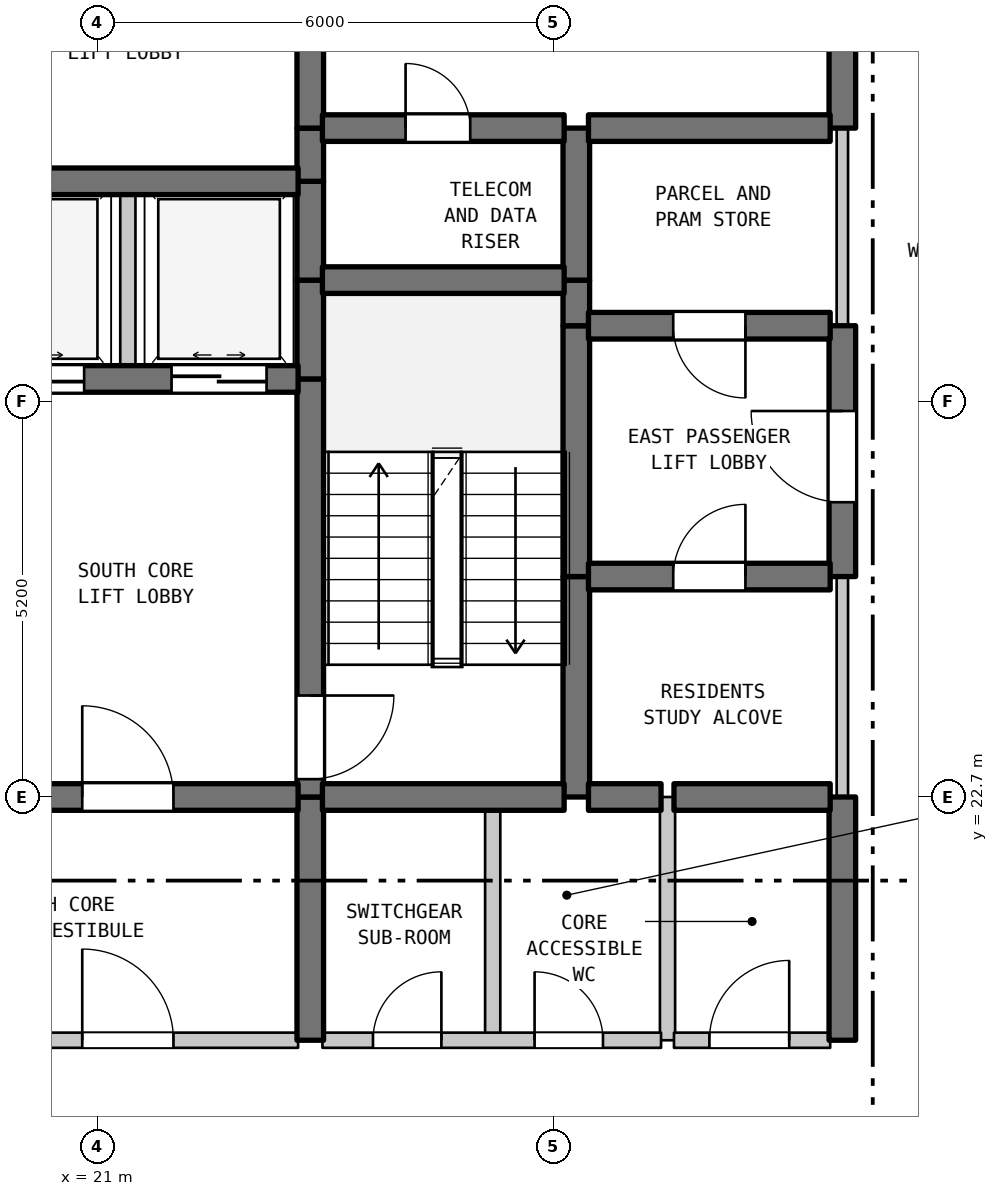
"""IFC4 building model, lengths in metres.
Left out: names, types, materials, properties, quantities, classifications, styles, units other than length and angle.
Written with IfcOpenShell. Run it as: python <this file> out.ifc"""

import sys

from ifc_helpers import new_model, si_unit, direction, frame, frame_2d, origin, place, context, subcontext, project, spatial, rectangle, extrude, element, fill, save


model = new_model("IFC4")
c1 = context("Model", 3, precision=1e-05, world=origin(), true_north=direction((0.0, 1.0)))
c2 = subcontext(c1, "Body", "Model", "MODEL_VIEW")
j1 = project(units=[si_unit("LENGTHUNIT", "METRE"), si_unit("PLANEANGLEUNIT", "RADIAN")], contexts=[c1])
p1 = place(None, origin())
s1 = spatial("IfcSite", under=j1, at=p1, CompositionType="ELEMENT")
p2 = place(p1, origin())
s2 = spatial("IfcBuilding", under=s1, at=p2, CompositionType="ELEMENT")
p3 = place(p2, frame((0.0, 0.0, 226.5)))
s3 = spatial("IfcBuildingStorey", under=s2, at=p3, CompositionType="ELEMENT", Elevation=226.5)
p4 = place(p3, frame((21.4, 28.2, 0.0), z_axis=(0.0, 0.0, 1.0), x_axis=(0.0, 1.0, 0.0)))
e1 = element("IfcWall", 1, at=p4, inside=s3, PredefinedType="STANDARD", context=c2, shape_type="SweptSolid", body=[
    extrude(rectangle(XDim=2.6, YDim=0.2, at=frame_2d((1.3, 0.0))), origin(), (0.0, 0.0, 1.0), 3.39),
])
p5 = place(p3, frame((23.8, 19.5, 0.0), z_axis=(0.0, 0.0, 1.0), x_axis=(0.0, 1.0, 0.0)))
e2 = element("IfcWall", 2, at=p5, inside=s3, PredefinedType="SHEAR", context=c2, shape_type="SweptSolid", body=[
    extrude(rectangle(XDim=3.2, YDim=0.35, at=frame_2d((1.6, 0.0))), origin(), (0.0, 0.0, 1.0), 3.39),
])
p6 = place(p3, frame((23.8, 22.7, 0.0), z_axis=(0.0, 0.0, 1.0), x_axis=(0.0, 1.0, 0.0)))
e3 = element("IfcWall", 3, at=p6, inside=s3, PredefinedType="SHEAR", context=c2, shape_type="SweptSolid", body=[
    extrude(rectangle(XDim=5.5, YDim=0.35, at=frame_2d((2.75, 0.0))), origin(), (0.0, 0.0, 1.0), 3.39),
])
p7 = place(p6, frame((0.235, 0.0, 0.0)))
e4 = element("IfcOpeningElement", 4, at=p7, cuts=e3, PredefinedType="OPENING", context=c2, shape_type="SweptSolid", body=[
    extrude(rectangle(XDim=1.1, YDim=2.15, at=frame_2d((0.55, 1.075))), frame((0.0, 0.185, 0.0), z_axis=(0.0, -1.0, 0.0), x_axis=(1.0, 0.0, 0.0)), (0.0, 0.0, 1.0), 0.37),
])
for number, where, z_axis, x_axis in (
    (5, (23.8, 28.2, 0.0), (0.0, 0.0, 1.0), (0.0, 1.0, 0.0)),
    (6, (23.8, 29.5, 0.0), (0.0, 0.0, 1.0), (0.0, 1.0, 0.0)),
):
    element("IfcWall", number, at=place(p3, frame(where, z_axis=z_axis, x_axis=x_axis)), inside=s3, PredefinedType="SHEAR", context=c2, shape_type="SweptSolid", body=[
        extrude(rectangle(XDim=1.3, YDim=0.35, at=frame_2d((0.65, 0.0))), origin(), (0.0, 0.0, 1.0), 3.39),
    ])
p8 = place(p3, frame((23.8, 30.8, 0.0), z_axis=(0.0, 0.0, 1.0), x_axis=(0.0, 1.0, 0.0)))
e7 = element("IfcWall", 7, at=p8, inside=s3, PredefinedType="SHEAR", context=c2, shape_type="SweptSolid", body=[
    extrude(rectangle(XDim=0.7, YDim=0.35, at=frame_2d((0.35, 0.0))), origin(), (0.0, 0.0, 1.0), 3.39),
])
p9 = place(p3, frame((23.8, 31.5, 0.0), z_axis=(0.0, 0.0, 1.0), x_axis=(0.0, 1.0, 0.0)))
e8 = element("IfcWall", 8, at=p9, inside=s3, PredefinedType="SHEAR", context=c2, shape_type="SweptSolid", body=[
    extrude(rectangle(XDim=3.5, YDim=0.35, at=frame_2d((1.75, 0.0))), origin(), (0.0, 0.0, 1.0), 3.39),
])
p10 = place(p9, frame((1.127, 0.0, 0.0)))
e9 = element("IfcOpeningElement", 9, at=p10, cuts=e8, PredefinedType="OPENING", context=c2, shape_type="SweptSolid", body=[
    extrude(rectangle(XDim=1.1, YDim=2.15, at=frame_2d((0.55, 1.075))), frame((0.0, 0.185, 0.0), z_axis=(0.0, -1.0, 0.0), x_axis=(1.0, 0.0, 0.0)), (0.0, 0.0, 1.0), 0.37),
])
p11 = place(p3, frame((26.2, 19.5, 0.0), z_axis=(0.0, 0.0, 1.0), x_axis=(0.0, 1.0, 0.0)))
e10 = element("IfcWall", 10, at=p11, inside=s3, PredefinedType="STANDARD", context=c2, shape_type="SweptSolid", body=[
    extrude(rectangle(XDim=3.2, YDim=0.2, at=frame_2d((1.6, 0.0))), origin(), (0.0, 0.0, 1.0), 3.39),
])
p12 = place(p3, frame((27.3, 22.7, 0.0), z_axis=(0.0, 0.0, 1.0), x_axis=(0.0, 1.0, 0.0)))
e11 = element("IfcWall", 11, at=p12, inside=s3, PredefinedType="SHEAR", context=c2, shape_type="SweptSolid", body=[
    extrude(rectangle(XDim=2.9, YDim=0.35, at=frame_2d((1.45, 0.0))), origin(), (0.0, 0.0, 1.0), 3.39),
])
p13 = place(p3, frame((27.3, 25.6, 0.0), z_axis=(0.0, 0.0, 1.0), x_axis=(0.0, 1.0, 0.0)))
e12 = element("IfcWall", 12, at=p13, inside=s3, PredefinedType="SHEAR", context=c2, shape_type="SweptSolid", body=[
    extrude(rectangle(XDim=3.3, YDim=0.35, at=frame_2d((1.65, 0.0))), origin(), (0.0, 0.0, 1.0), 3.39),
])
p14 = place(p3, frame((27.3, 28.9, 0.0), z_axis=(0.0, 0.0, 1.0), x_axis=(0.0, 1.0, 0.0)))
e13 = element("IfcWall", 13, at=p14, inside=s3, PredefinedType="SHEAR", context=c2, shape_type="SweptSolid", body=[
    extrude(rectangle(XDim=0.6, YDim=0.35, at=frame_2d((0.3, 0.0))), origin(), (0.0, 0.0, 1.0), 3.39),
])
p15 = place(p3, frame((27.3, 29.5, 0.0), z_axis=(0.0, 0.0, 1.0), x_axis=(0.0, 1.0, 0.0)))
e14 = element("IfcWall", 14, at=p15, inside=s3, PredefinedType="SHEAR", context=c2, shape_type="SweptSolid", body=[
    extrude(rectangle(XDim=2.0, YDim=0.35, at=frame_2d((1.0, 0.0))), origin(), (0.0, 0.0, 1.0), 3.39),
])
p16 = place(p3, frame((28.5, 19.5, 0.0), z_axis=(0.0, 0.0, 1.0), x_axis=(0.0, 1.0, 0.0)))
e15 = element("IfcWall", 15, at=p16, inside=s3, PredefinedType="STANDARD", context=c2, shape_type="SweptSolid", body=[
    extrude(rectangle(XDim=3.2, YDim=0.2, at=frame_2d((1.6, 0.0))), origin(), (0.0, 0.0, 1.0), 3.39),
])
p17 = place(p3, frame((30.8, 19.5, 0.0), z_axis=(0.0, 0.0, 1.0), x_axis=(0.0, 1.0, 0.0)))
e16 = element("IfcWall", 16, at=p17, inside=s3, PredefinedType="SHEAR", context=c2, shape_type="SweptSolid", body=[
    extrude(rectangle(XDim=3.2, YDim=0.35, at=frame_2d((1.6, 0.0))), origin(), (0.0, 0.0, 1.0), 3.39),
])
p18 = place(p3, frame((30.8, 22.7, 0.0), z_axis=(0.0, 0.0, 1.0), x_axis=(0.0, 1.0, 0.0)))
e17 = element("IfcWall", 17, at=p18, inside=s3, PredefinedType="STANDARD", context=c2, shape_type="SweptSolid", body=[
    extrude(rectangle(XDim=2.9, YDim=0.15, at=frame_2d((1.45, 0.0))), origin(), (0.0, 0.0, 1.0), 3.39),
])
p19 = place(p3, frame((30.8, 25.6, 0.0), z_axis=(0.0, 0.0, 1.0), x_axis=(0.0, 1.0, 0.0)))
e18 = element("IfcWall", 18, at=p19, inside=s3, PredefinedType="SHEAR", context=c2, shape_type="SweptSolid", body=[
    extrude(rectangle(XDim=3.3, YDim=0.35, at=frame_2d((1.65, 0.0))), origin(), (0.0, 0.0, 1.0), 3.39),
])
p20 = place(p19, frame((0.978, 0.0, 0.0)))
e19 = element("IfcOpeningElement", 19, at=p20, cuts=e18, PredefinedType="OPENING", context=c2, shape_type="SweptSolid", body=[
    extrude(rectangle(XDim=1.2, YDim=2.2, at=frame_2d((0.6, 1.1))), frame((0.0, 0.185, 0.0), z_axis=(0.0, -1.0, 0.0), x_axis=(1.0, 0.0, 0.0)), (0.0, 0.0, 1.0), 0.37),
])
p21 = place(p3, frame((30.8, 28.9, 0.0), z_axis=(0.0, 0.0, 1.0), x_axis=(0.0, 1.0, 0.0)))
e20 = element("IfcWall", 20, at=p21, inside=s3, PredefinedType="STANDARD", context=c2, shape_type="SweptSolid", body=[
    extrude(rectangle(XDim=2.6, YDim=0.15, at=frame_2d((1.3, 0.0))), origin(), (0.0, 0.0, 1.0), 3.39),
])
p22 = place(p3, frame((30.8, 31.5, 0.0), z_axis=(0.0, 0.0, 1.0), x_axis=(0.0, 1.0, 0.0)))
e21 = element("IfcWall", 21, at=p22, inside=s3, PredefinedType="SHEAR", context=c2, shape_type="SweptSolid", body=[
    extrude(rectangle(XDim=3.5, YDim=0.35, at=frame_2d((1.75, 0.0))), origin(), (0.0, 0.0, 1.0), 3.39),
])
p23 = place(p22, frame((1.15, 0.0, 0.0)))
e22 = element("IfcOpeningElement", 22, at=p23, cuts=e21, PredefinedType="OPENING", context=c2, shape_type="SweptSolid", body=[
    extrude(rectangle(XDim=1.2, YDim=2.2, at=frame_2d((0.6, 1.1))), frame((0.0, 0.185, 0.0), z_axis=(0.0, -1.0, 0.0), x_axis=(1.0, 0.0, 0.0)), (0.0, 0.0, 1.0), 0.37),
])
p24 = place(p3, frame((19.16, 19.5, 0.0), z_axis=(0.0, 0.0, 1.0), x_axis=(1.0, 0.0, 0.0)))
e23 = element("IfcWall", 23, at=p24, inside=s3, PredefinedType="STANDARD", context=c2, shape_type="SweptSolid", body=[
    extrude(rectangle(XDim=4.48, YDim=0.2, at=frame_2d((2.24, 0.0))), origin(), (0.0, 0.0, 1.0), 3.39),
])
p25 = place(p24, frame((1.64, 0.0, 0.0)))
e24 = element("IfcOpeningElement", 24, at=p25, cuts=e23, PredefinedType="OPENING", context=c2, shape_type="SweptSolid", body=[
    extrude(rectangle(XDim=1.2, YDim=2.2, at=frame_2d((0.6, 1.1))), frame((0.0, 0.11, 0.0), z_axis=(0.0, -1.0, 0.0), x_axis=(1.0, 0.0, 0.0)), (0.0, 0.0, 1.0), 0.22),
])
p26 = place(p3, frame((23.96, 19.5, 0.0), z_axis=(0.0, 0.0, 1.0), x_axis=(1.0, 0.0, 0.0)))
e25 = element("IfcWall", 25, at=p26, inside=s3, PredefinedType="STANDARD", context=c2, shape_type="SweptSolid", body=[
    extrude(rectangle(XDim=4.455, YDim=0.2, at=frame_2d((2.228, 0.0))), origin(), (0.0, 0.0, 1.0), 3.39),
])
p27 = place(p26, frame((0.665, 0.0, 0.0)))
e26 = element("IfcOpeningElement", 26, at=p27, cuts=e25, PredefinedType="OPENING", context=c2, shape_type="SweptSolid", body=[
    extrude(rectangle(XDim=0.9, YDim=2.15, at=frame_2d((0.45, 1.075))), frame((0.0, 0.11, 0.0), z_axis=(0.0, -1.0, 0.0), x_axis=(1.0, 0.0, 0.0)), (0.0, 0.0, 1.0), 0.22),
])
p28 = place(p26, frame((2.791, 0.0, 0.0)))
e27 = element("IfcOpeningElement", 27, at=p28, cuts=e25, PredefinedType="OPENING", context=c2, shape_type="SweptSolid", body=[
    extrude(rectangle(XDim=0.9, YDim=2.15, at=frame_2d((0.45, 1.075))), frame((0.0, 0.11, 0.0), z_axis=(0.0, -1.0, 0.0), x_axis=(1.0, 0.0, 0.0)), (0.0, 0.0, 1.0), 0.22),
])
p29 = place(p3, frame((28.585, 19.5, 0.0), z_axis=(0.0, 0.0, 1.0), x_axis=(1.0, 0.0, 0.0)))
e28 = element("IfcWall", 28, at=p29, inside=s3, PredefinedType="STANDARD", context=c2, shape_type="SweptSolid", body=[
    extrude(rectangle(XDim=2.055, YDim=0.2, at=frame_2d((1.027, 0.0))), origin(), (0.0, 0.0, 1.0), 3.39),
])
p30 = place(p29, frame((0.466, 0.0, 0.0)))
e29 = element("IfcOpeningElement", 29, at=p30, cuts=e28, PredefinedType="OPENING", context=c2, shape_type="SweptSolid", body=[
    extrude(rectangle(XDim=1.05, YDim=2.15, at=frame_2d((0.525, 1.075))), frame((0.0, 0.11, 0.0), z_axis=(0.0, -1.0, 0.0), x_axis=(1.0, 0.0, 0.0)), (0.0, 0.0, 1.0), 0.22),
])
p31 = place(p3, frame((19.16, 22.7, 0.0), z_axis=(0.0, 0.0, 1.0), x_axis=(1.0, 0.0, 0.0)))
e30 = element("IfcWall", 30, at=p31, inside=s3, PredefinedType="SHEAR", context=c2, shape_type="SweptSolid", body=[
    extrude(rectangle(XDim=4.48, YDim=0.35, at=frame_2d((2.24, 0.0))), origin(), (0.0, 0.0, 1.0), 3.39),
])
p32 = place(p31, frame((1.64, 0.0, 0.0)))
e31 = element("IfcOpeningElement", 31, at=p32, cuts=e30, PredefinedType="OPENING", context=c2, shape_type="SweptSolid", body=[
    extrude(rectangle(XDim=1.2, YDim=2.2, at=frame_2d((0.6, 1.1))), frame((0.0, 0.185, 0.0), z_axis=(0.0, -1.0, 0.0), x_axis=(1.0, 0.0, 0.0)), (0.0, 0.0, 1.0), 0.37),
])
p33 = place(p3, frame((23.96, 22.7, 0.0), z_axis=(0.0, 0.0, 1.0), x_axis=(1.0, 0.0, 0.0)))
e32 = element("IfcWall", 32, at=p33, inside=s3, PredefinedType="SHEAR", context=c2, shape_type="SweptSolid", body=[
    extrude(rectangle(XDim=3.18, YDim=0.35, at=frame_2d((1.59, 0.0))), origin(), (0.0, 0.0, 1.0), 3.39),
])
p34 = place(p3, frame((27.46, 22.7, 0.0), z_axis=(0.0, 0.0, 1.0), x_axis=(1.0, 0.0, 0.0)))
e33 = element("IfcWall", 33, at=p34, inside=s3, PredefinedType="SHEAR", context=c2, shape_type="SweptSolid", body=[
    extrude(rectangle(XDim=0.955, YDim=0.35, at=frame_2d((0.478, 0.0))), origin(), (0.0, 0.0, 1.0), 3.39),
])
p35 = place(p3, frame((28.585, 22.7, 0.0), z_axis=(0.0, 0.0, 1.0), x_axis=(1.0, 0.0, 0.0)))
e34 = element("IfcWall", 34, at=p35, inside=s3, PredefinedType="SHEAR", context=c2, shape_type="SweptSolid", body=[
    extrude(rectangle(XDim=2.055, YDim=0.35, at=frame_2d((1.027, 0.0))), origin(), (0.0, 0.0, 1.0), 3.39),
])
p36 = place(p3, frame((27.46, 25.6, 0.0), z_axis=(0.0, 0.0, 1.0), x_axis=(1.0, 0.0, 0.0)))
e35 = element("IfcWall", 35, at=p36, inside=s3, PredefinedType="SHEAR", context=c2, shape_type="SweptSolid", body=[
    extrude(rectangle(XDim=3.18, YDim=0.35, at=frame_2d((1.59, 0.0))), origin(), (0.0, 0.0, 1.0), 3.39),
])
p37 = place(p36, frame((1.115, 0.0, 0.0)))
e36 = element("IfcOpeningElement", 36, at=p37, cuts=e35, PredefinedType="OPENING", context=c2, shape_type="SweptSolid", body=[
    extrude(rectangle(XDim=0.95, YDim=2.15, at=frame_2d((0.475, 1.075))), frame((0.0, 0.185, 0.0), z_axis=(0.0, -1.0, 0.0), x_axis=(1.0, 0.0, 0.0)), (0.0, 0.0, 1.0), 0.37),
])
p38 = place(p3, frame((19.16, 28.2, 0.0), z_axis=(0.0, 0.0, 1.0), x_axis=(1.0, 0.0, 0.0)))
e37 = element("IfcWall", 37, at=p38, inside=s3, PredefinedType="SHEAR", context=c2, shape_type="SweptSolid", body=[
    extrude(rectangle(XDim=4.48, YDim=0.35, at=frame_2d((2.24, 0.0))), origin(), (0.0, 0.0, 1.0), 3.39),
])
p39 = place(p38, frame((0.415, 0.0, 0.0)))
e38 = element("IfcOpeningElement", 38, at=p39, cuts=e37, PredefinedType="OPENING", context=c2, shape_type="SweptSolid", body=[
    extrude(rectangle(XDim=1.25, YDim=2.2, at=frame_2d((0.625, 1.1))), frame((0.0, 0.185, 0.0), z_axis=(0.0, -1.0, 0.0), x_axis=(1.0, 0.0, 0.0)), (0.0, 0.0, 1.0), 0.37),
])
p40 = place(p38, frame((2.815, 0.0, 0.0)))
e39 = element("IfcOpeningElement", 39, at=p40, cuts=e37, PredefinedType="OPENING", context=c2, shape_type="SweptSolid", body=[
    extrude(rectangle(XDim=1.25, YDim=2.2, at=frame_2d((0.625, 1.1))), frame((0.0, 0.185, 0.0), z_axis=(0.0, -1.0, 0.0), x_axis=(1.0, 0.0, 0.0)), (0.0, 0.0, 1.0), 0.37),
])
p41 = place(p3, frame((27.46, 28.9, 0.0), z_axis=(0.0, 0.0, 1.0), x_axis=(1.0, 0.0, 0.0)))
e40 = element("IfcWall", 40, at=p41, inside=s3, PredefinedType="SHEAR", context=c2, shape_type="SweptSolid", body=[
    extrude(rectangle(XDim=3.18, YDim=0.35, at=frame_2d((1.59, 0.0))), origin(), (0.0, 0.0, 1.0), 3.39),
])
p42 = place(p41, frame((1.115, 0.0, 0.0)))
e41 = element("IfcOpeningElement", 41, at=p42, cuts=e40, PredefinedType="OPENING", context=c2, shape_type="SweptSolid", body=[
    extrude(rectangle(XDim=0.95, YDim=2.15, at=frame_2d((0.475, 1.075))), frame((0.0, 0.185, 0.0), z_axis=(0.0, -1.0, 0.0), x_axis=(1.0, 0.0, 0.0)), (0.0, 0.0, 1.0), 0.37),
])
p43 = place(p3, frame((23.96, 29.5, 0.0), z_axis=(0.0, 0.0, 1.0), x_axis=(1.0, 0.0, 0.0)))
e42 = element("IfcWall", 42, at=p43, inside=s3, PredefinedType="SHEAR", context=c2, shape_type="SweptSolid", body=[
    extrude(rectangle(XDim=3.18, YDim=0.35, at=frame_2d((1.59, 0.0))), origin(), (0.0, 0.0, 1.0), 3.39),
])
p44 = place(p3, frame((19.16, 30.8, 0.0), z_axis=(0.0, 0.0, 1.0), x_axis=(1.0, 0.0, 0.0)))
e43 = element("IfcWall", 43, at=p44, inside=s3, PredefinedType="SHEAR", context=c2, shape_type="SweptSolid", body=[
    extrude(rectangle(XDim=4.48, YDim=0.35, at=frame_2d((2.24, 0.0))), origin(), (0.0, 0.0, 1.0), 3.39),
])
p45 = place(p3, frame((23.96, 31.5, 0.0), z_axis=(0.0, 0.0, 1.0), x_axis=(1.0, 0.0, 0.0)))
e44 = element("IfcWall", 44, at=p45, inside=s3, PredefinedType="SHEAR", context=c2, shape_type="SweptSolid", body=[
    extrude(rectangle(XDim=3.18, YDim=0.35, at=frame_2d((1.59, 0.0))), origin(), (0.0, 0.0, 1.0), 3.39),
])
p46 = place(p45, frame((1.094, 0.0, 0.0)))
e45 = element("IfcOpeningElement", 45, at=p46, cuts=e44, PredefinedType="OPENING", context=c2, shape_type="SweptSolid", body=[
    extrude(rectangle(XDim=0.85, YDim=2.1, at=frame_2d((0.425, 1.05))), frame((0.0, 0.185, 0.0), z_axis=(0.0, -1.0, 0.0), x_axis=(1.0, 0.0, 0.0)), (0.0, 0.0, 1.0), 0.37),
])
p47 = place(p3, frame((27.46, 31.5, 0.0), z_axis=(0.0, 0.0, 1.0), x_axis=(1.0, 0.0, 0.0)))
e46 = element("IfcWall", 46, at=p47, inside=s3, PredefinedType="SHEAR", context=c2, shape_type="SweptSolid", body=[
    extrude(rectangle(XDim=3.18, YDim=0.35, at=frame_2d((1.59, 0.0))), origin(), (0.0, 0.0, 1.0), 3.39),
])
p48 = place(p7, frame((1.1, 0.0, 0.0), z_axis=(0.0, 0.0, 1.0), x_axis=(-1.0, 0.0, 0.0)))
e47 = element("IfcDoor", 47, at=p48, inside=s3, OperationType="SINGLE_SWING_RIGHT", PredefinedType="DOOR", context=c2, shape_type="SweptSolid", body=[
    extrude(rectangle(XDim=1.1, YDim=2.15, at=frame_2d((0.55, 1.075))), frame((0.0, 0.025, 0.0), z_axis=(0.0, -1.0, 0.0), x_axis=(1.0, 0.0, 0.0)), (0.0, 0.0, 1.0), 0.05),
])
fill(e4, e47)
p49 = place(p20, origin())
e48 = element("IfcDoor", 48, at=p49, inside=s3, OperationType="SINGLE_SWING_RIGHT", PredefinedType="DOOR", context=c2, shape_type="SweptSolid", body=[
    extrude(rectangle(XDim=1.2, YDim=2.2, at=frame_2d((0.6, 1.1))), frame((0.0, 0.025, 0.0), z_axis=(0.0, -1.0, 0.0), x_axis=(1.0, 0.0, 0.0)), (0.0, 0.0, 1.0), 0.05),
])
fill(e19, e48)
p50 = place(p25, origin())
e49 = element("IfcDoor", 49, at=p50, inside=s3, OperationType="SINGLE_SWING_LEFT", PredefinedType="DOOR", context=c2, shape_type="SweptSolid", body=[
    extrude(rectangle(XDim=1.2, YDim=2.2, at=frame_2d((0.6, 1.1))), frame((0.0, 0.025, 0.0), z_axis=(0.0, -1.0, 0.0), x_axis=(1.0, 0.0, 0.0)), (0.0, 0.0, 1.0), 0.05),
])
fill(e24, e49)
p51 = place(p27, origin())
e50 = element("IfcDoor", 50, at=p51, inside=s3, OperationType="SINGLE_SWING_RIGHT", PredefinedType="DOOR", context=c2, shape_type="SweptSolid", body=[
    extrude(rectangle(XDim=0.9, YDim=2.15, at=frame_2d((0.45, 1.075))), frame((0.0, 0.025, 0.0), z_axis=(0.0, -1.0, 0.0), x_axis=(1.0, 0.0, 0.0)), (0.0, 0.0, 1.0), 0.05),
])
fill(e26, e50)
p52 = place(p28, origin())
e51 = element("IfcDoor", 51, at=p52, inside=s3, OperationType="SINGLE_SWING_LEFT", PredefinedType="DOOR", context=c2, shape_type="SweptSolid", body=[
    extrude(rectangle(XDim=0.9, YDim=2.15, at=frame_2d((0.45, 1.075))), frame((0.0, 0.025, 0.0), z_axis=(0.0, -1.0, 0.0), x_axis=(1.0, 0.0, 0.0)), (0.0, 0.0, 1.0), 0.05),
])
fill(e27, e51)
p53 = place(p30, origin())
e52 = element("IfcDoor", 52, at=p53, inside=s3, OperationType="SINGLE_SWING_RIGHT", PredefinedType="DOOR", context=c2, shape_type="SweptSolid", body=[
    extrude(rectangle(XDim=1.05, YDim=2.15, at=frame_2d((0.525, 1.075))), frame((0.0, 0.025, 0.0), z_axis=(0.0, -1.0, 0.0), x_axis=(1.0, 0.0, 0.0)), (0.0, 0.0, 1.0), 0.05),
])
fill(e29, e52)
p54 = place(p32, origin())
e53 = element("IfcDoor", 53, at=p54, inside=s3, OperationType="SINGLE_SWING_LEFT", PredefinedType="DOOR", context=c2, shape_type="SweptSolid", body=[
    extrude(rectangle(XDim=1.2, YDim=2.2, at=frame_2d((0.6, 1.1))), frame((0.0, 0.025, 0.0), z_axis=(0.0, -1.0, 0.0), x_axis=(1.0, 0.0, 0.0)), (0.0, 0.0, 1.0), 0.05),
])
fill(e31, e53)
p55 = place(p37, origin())
e54 = element("IfcDoor", 54, at=p55, inside=s3, OperationType="SINGLE_SWING_RIGHT", PredefinedType="DOOR", context=c2, shape_type="SweptSolid", body=[
    extrude(rectangle(XDim=0.95, YDim=2.15, at=frame_2d((0.475, 1.075))), frame((0.0, 0.025, 0.0), z_axis=(0.0, -1.0, 0.0), x_axis=(1.0, 0.0, 0.0)), (0.0, 0.0, 1.0), 0.05),
])
fill(e36, e54)
p56 = place(p39, origin())
e55 = element("IfcDoor", 55, at=p56, inside=s3, OperationType="DOUBLE_DOOR_SLIDING", PredefinedType="DOOR", context=c2, shape_type="SweptSolid", body=[
    extrude(rectangle(XDim=1.25, YDim=2.2, at=frame_2d((0.625, 1.1))), frame((0.0, 0.025, 0.0), z_axis=(0.0, -1.0, 0.0), x_axis=(1.0, 0.0, 0.0)), (0.0, 0.0, 1.0), 0.05),
])
fill(e38, e55)
p57 = place(p40, origin())
e56 = element("IfcDoor", 56, at=p57, inside=s3, OperationType="DOUBLE_DOOR_SLIDING", PredefinedType="DOOR", context=c2, shape_type="SweptSolid", body=[
    extrude(rectangle(XDim=1.25, YDim=2.2, at=frame_2d((0.625, 1.1))), frame((0.0, 0.025, 0.0), z_axis=(0.0, -1.0, 0.0), x_axis=(1.0, 0.0, 0.0)), (0.0, 0.0, 1.0), 0.05),
])
fill(e39, e56)
p58 = place(p42, frame((0.95, 0.0, 0.0), z_axis=(0.0, 0.0, 1.0), x_axis=(-1.0, 0.0, 0.0)))
e57 = element("IfcDoor", 57, at=p58, inside=s3, OperationType="SINGLE_SWING_RIGHT", PredefinedType="DOOR", context=c2, shape_type="SweptSolid", body=[
    extrude(rectangle(XDim=0.95, YDim=2.15, at=frame_2d((0.475, 1.075))), frame((0.0, 0.025, 0.0), z_axis=(0.0, -1.0, 0.0), x_axis=(1.0, 0.0, 0.0)), (0.0, 0.0, 1.0), 0.05),
])
fill(e41, e57)
p59 = place(p46, origin())
e58 = element("IfcDoor", 58, at=p59, inside=s3, OperationType="SINGLE_SWING_LEFT", PredefinedType="DOOR", context=c2, shape_type="SweptSolid", body=[
    extrude(rectangle(XDim=0.85, YDim=2.1, at=frame_2d((0.425, 1.05))), frame((0.0, 0.025, 0.0), z_axis=(0.0, -1.0, 0.0), x_axis=(1.0, 0.0, 0.0)), (0.0, 0.0, 1.0), 0.05),
])
fill(e45, e58)
save(model, sys.argv[1])
